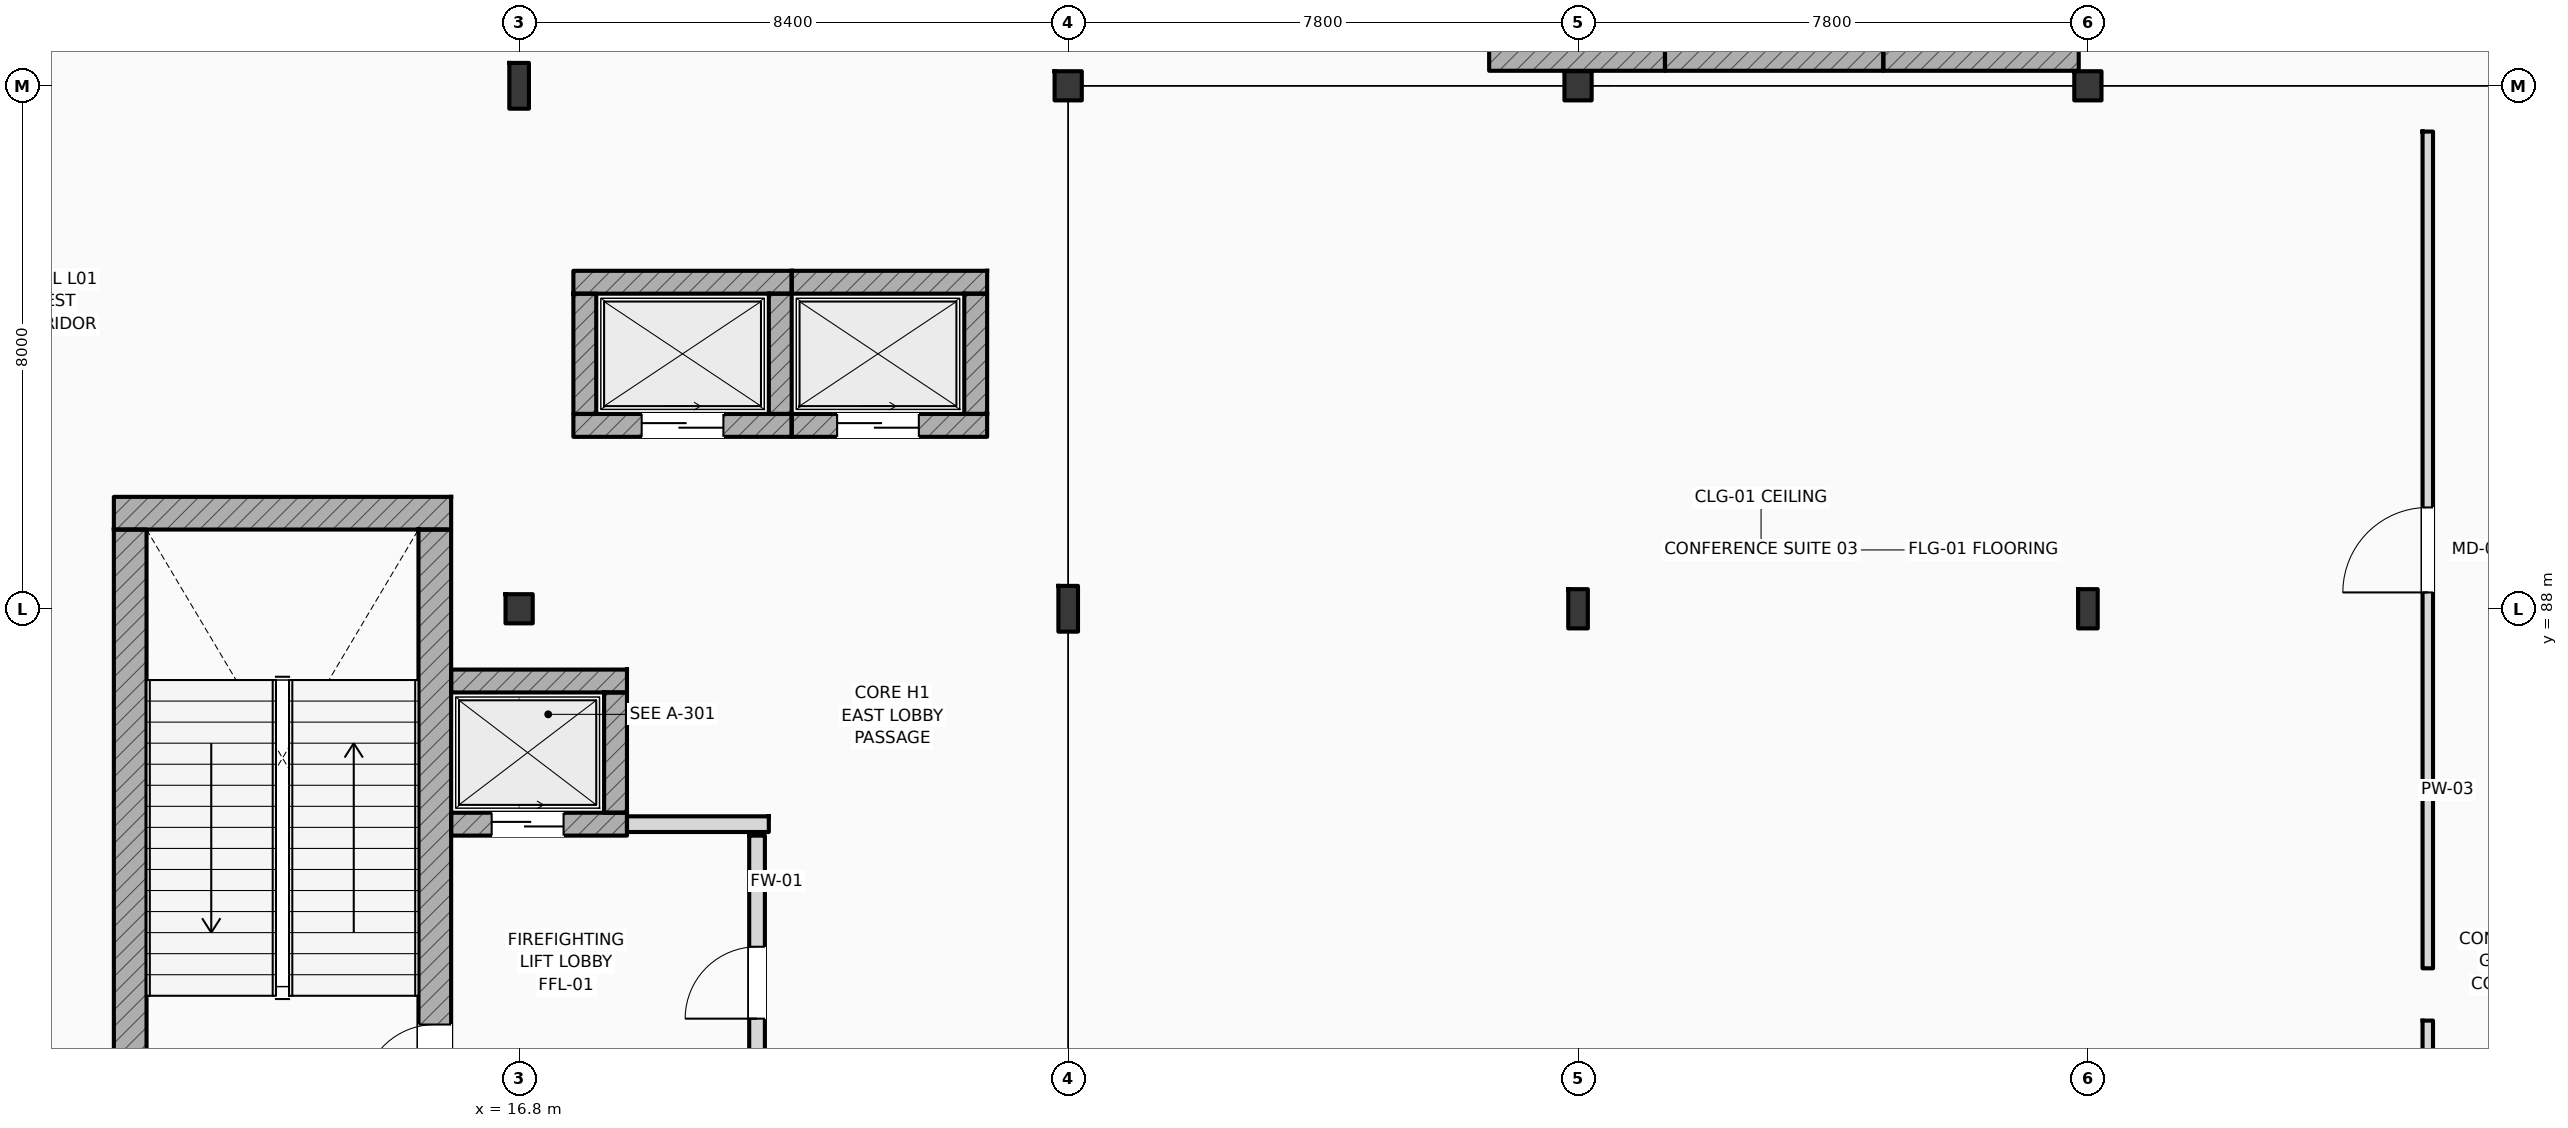
"""IFC4 building model, lengths in metres.
Left out: names, types, materials, properties, quantities, classifications, styles, units other than length and angle.
Written with IfcOpenShell. Run it as: python <this file> out.ifc"""

import sys

from ifc_helpers import new_model, si_unit, direction, frame, frame_2d, origin, origin_2d, place, context, subcontext, project, spatial, rectangle, i_section, extrude, element, fill, save


model = new_model("IFC4")
c1 = context("Model", 3, precision=1e-05, world=origin(), true_north=direction((0.0, 1.0)))
c2 = subcontext(c1, "Body", "Model", "MODEL_VIEW")
j1 = project(units=[si_unit("LENGTHUNIT", "METRE"), si_unit("PLANEANGLEUNIT", "RADIAN")], contexts=[c1])
p1 = place(None, origin())
s1 = spatial("IfcSite", under=j1, at=p1, CompositionType="ELEMENT")
p2 = place(p1, origin())
s2 = spatial("IfcBuilding", under=s1, at=p2, CompositionType="ELEMENT")
p3 = place(p2, frame((0.0, 0.0, 6.0)))
s3 = spatial("IfcBuildingStorey", under=s2, at=p3, CompositionType="ELEMENT", Elevation=6.0)
p4 = place(p3, frame((16.8, 88.0, 0.0), z_axis=(0.0, 0.0, 1.0), x_axis=(1.0, 0.0, 0.0)))
e1 = element("IfcColumn", 1, at=p4, inside=s3, PredefinedType="COLUMN", context=c2, shape_type="SweptSolid", body=[
    extrude(i_section(OverallWidth=0.416, OverallDepth=0.446, WebThickness=0.036, FlangeThickness=0.048, FilletRadius=0.015, at=origin_2d()), origin(), (0.0, 0.0, 1.0), 5.4),
])
for number, where, z_axis, x_axis in (
    (2, (16.8, 96.0, 0.0), (0.0, 0.0, 1.0), (1.0, 0.0, 0.0)),
    (3, (25.2, 88.0, 0.0), (0.0, 0.0, 1.0), (1.0, 0.0, 0.0)),
):
    element("IfcColumn", number, at=place(p3, frame(where, z_axis=z_axis, x_axis=x_axis)), inside=s3, PredefinedType="COLUMN", context=c2, shape_type="SweptSolid", body=[
        extrude(i_section(OverallWidth=0.3, OverallDepth=0.7, WebThickness=0.017, FlangeThickness=0.032, FilletRadius=0.027, at=origin_2d()), origin(), (0.0, 0.0, 1.0), 5.4),
    ])
for number, where, z_axis, x_axis in (
    (4, (25.2, 96.0, 0.0), (0.0, 0.0, 1.0), (1.0, 0.0, 0.0)),
    (5, (33.0, 96.0, 0.0), (0.0, 0.0, 1.0), (1.0, 0.0, 0.0)),
    (6, (40.8, 96.0, 0.0), (0.0, 0.0, 1.0), (1.0, 0.0, 0.0)),
):
    element("IfcColumn", number, at=place(p3, frame(where, z_axis=z_axis, x_axis=x_axis)), inside=s3, PredefinedType="COLUMN", context=c2, shape_type="SweptSolid", body=[
        extrude(i_section(OverallWidth=0.416, OverallDepth=0.446, WebThickness=0.036, FlangeThickness=0.048, FilletRadius=0.015, at=origin_2d()), origin(), (0.0, 0.0, 1.0), 5.4),
    ])
for number, where, z_axis, x_axis in (
    (7, (33.0, 88.0, 0.0), (0.0, 0.0, 1.0), (1.0, 0.0, 0.0)),
    (8, (40.8, 88.0, 0.0), (0.0, 0.0, 1.0), (1.0, 0.0, 0.0)),
):
    element("IfcColumn", number, at=place(p3, frame(where, z_axis=z_axis, x_axis=x_axis)), inside=s3, PredefinedType="COLUMN", context=c2, shape_type="SweptSolid", body=[
        extrude(i_section(OverallWidth=0.3, OverallDepth=0.6, WebThickness=0.015, FlangeThickness=0.03, FilletRadius=0.027, at=origin_2d()), origin(), (0.0, 0.0, 1.0), 5.4),
    ])
p5 = place(p3, frame((10.6, 89.462, 0.0), z_axis=(0.0, 0.0, 1.0), x_axis=(1.0, 0.0, 0.0)))
e9 = element("IfcWall", 9, at=p5, inside=s3, PredefinedType="SHEAR", context=c2, shape_type="SweptSolid", body=[
    extrude(rectangle(XDim=5.16, YDim=0.5, at=frame_2d((2.58, 0.0))), origin(), (0.0, 0.0, 1.0), 5.4),
])
p6 = place(p3, frame((10.85, 80.1, 0.0), z_axis=(0.0, 0.0, 1.0), x_axis=(0.0, 1.0, 0.0)))
e10 = element("IfcWall", 10, at=p6, inside=s3, PredefinedType="SHEAR", context=c2, shape_type="SweptSolid", body=[
    extrude(rectangle(XDim=9.112, YDim=0.5, at=frame_2d((4.556, 0.0))), origin(), (0.0, 0.0, 1.0), 5.4),
])
p7 = place(p3, frame((15.51, 80.1, 0.0), z_axis=(0.0, 0.0, 1.0), x_axis=(0.0, 1.0, 0.0)))
e11 = element("IfcWall", 11, at=p7, inside=s3, PredefinedType="SHEAR", context=c2, shape_type="SweptSolid", body=[
    extrude(rectangle(XDim=9.112, YDim=0.5, at=frame_2d((4.556, 0.0))), origin(), (0.0, 0.0, 1.0), 5.4),
])
p8 = place(p7, frame((0.44, 0.0, 0.0)))
e12 = element("IfcOpeningElement", 12, at=p8, cuts=e11, PredefinedType="OPENING", context=c2, shape_type="SweptSolid", body=[
    extrude(rectangle(XDim=1.1, YDim=2.2, at=frame_2d((0.55, 1.1))), frame((0.0, 0.26, 0.0), z_axis=(0.0, -1.0, 0.0), x_axis=(1.0, 0.0, 0.0)), (0.0, 0.0, 1.0), 0.52),
])
p9 = place(p3, frame((15.76, 86.895, 0.0), z_axis=(0.0, 0.0, 1.0), x_axis=(1.0, 0.0, 0.0)))
e13 = element("IfcWall", 13, at=p9, inside=s3, PredefinedType="SHEAR", context=c2, shape_type="SweptSolid", body=[
    extrude(rectangle(XDim=2.69, YDim=0.35, at=frame_2d((1.345, 0.0))), origin(), (0.0, 0.0, 1.0), 5.05),
])
p10 = place(p3, frame((15.76, 84.705, 0.0), z_axis=(0.0, 0.0, 1.0), x_axis=(1.0, 0.0, 0.0)))
e14 = element("IfcWall", 14, at=p10, inside=s3, PredefinedType="SHEAR", context=c2, shape_type="SweptSolid", body=[
    extrude(rectangle(XDim=2.69, YDim=0.35, at=frame_2d((1.345, 0.0))), origin(), (0.0, 0.0, 1.0), 5.05),
])
p11 = place(p10, frame((0.62, 0.0, 0.0)))
e15 = element("IfcOpeningElement", 15, at=p11, cuts=e14, PredefinedType="OPENING", context=c2, shape_type="SweptSolid", body=[
    extrude(rectangle(XDim=1.1, YDim=2.2, at=frame_2d((0.55, 1.1))), frame((0.0, 0.185, 0.0), z_axis=(0.0, -1.0, 0.0), x_axis=(1.0, 0.0, 0.0)), (0.0, 0.0, 1.0), 0.37),
])
p12 = place(p3, frame((18.275, 84.88, 0.0), z_axis=(0.0, 0.0, 1.0), x_axis=(0.0, 1.0, 0.0)))
e16 = element("IfcWall", 16, at=p12, inside=s3, PredefinedType="SHEAR", context=c2, shape_type="SweptSolid", body=[
    extrude(rectangle(XDim=1.84, YDim=0.35, at=frame_2d((0.92, 0.0))), origin(), (0.0, 0.0, 1.0), 5.05),
])
p13 = place(p3, frame((31.64, 96.405, 0.0), z_axis=(0.0, 0.0, 1.0), x_axis=(1.0, 0.0, 0.0)))
e17 = element("IfcWall", 17, at=p13, inside=s3, PredefinedType="SHEAR", context=c2, shape_type="SweptSolid", body=[
    extrude(rectangle(XDim=2.69, YDim=0.35, at=frame_2d((1.345, 0.0))), origin(), (0.0, 0.0, 1.0), 5.05),
])
p14 = place(p3, frame((17.63, 92.995, 0.0), z_axis=(0.0, 0.0, 1.0), x_axis=(1.0, 0.0, 0.0)))
e18 = element("IfcWall", 18, at=p14, inside=s3, PredefinedType="SHEAR", context=c2, shape_type="SweptSolid", body=[
    extrude(rectangle(XDim=3.34, YDim=0.35, at=frame_2d((1.67, 0.0))), origin(), (0.0, 0.0, 1.0), 5.05),
])
p15 = place(p3, frame((17.63, 90.805, 0.0), z_axis=(0.0, 0.0, 1.0), x_axis=(1.0, 0.0, 0.0)))
e19 = element("IfcWall", 19, at=p15, inside=s3, PredefinedType="SHEAR", context=c2, shape_type="SweptSolid", body=[
    extrude(rectangle(XDim=3.34, YDim=0.35, at=frame_2d((1.67, 0.0))), origin(), (0.0, 0.0, 1.0), 5.05),
])
p16 = place(p15, frame((1.045, 0.0, 0.0)))
e20 = element("IfcOpeningElement", 20, at=p16, cuts=e19, PredefinedType="OPENING", context=c2, shape_type="SweptSolid", body=[
    extrude(rectangle(XDim=1.25, YDim=2.25, at=frame_2d((0.625, 1.125))), frame((0.0, 0.185, 0.0), z_axis=(0.0, -1.0, 0.0), x_axis=(1.0, 0.0, 0.0)), (0.0, 0.0, 1.0), 0.37),
])
for number, where, z_axis, x_axis in (
    (21, (17.805, 90.98, 0.0), (0.0, 0.0, 1.0), (0.0, 1.0, 0.0)),
    (22, (20.795, 90.98, 0.0), (0.0, 0.0, 1.0), (0.0, 1.0, 0.0)),
):
    element("IfcWall", number, at=place(p3, frame(where, z_axis=z_axis, x_axis=x_axis)), inside=s3, PredefinedType="SHEAR", context=c2, shape_type="SweptSolid", body=[
        extrude(rectangle(XDim=1.84, YDim=0.35, at=frame_2d((0.92, 0.0))), origin(), (0.0, 0.0, 1.0), 5.05),
    ])
p17 = place(p3, frame((20.97, 92.995, 0.0), z_axis=(0.0, 0.0, 1.0), x_axis=(1.0, 0.0, 0.0)))
e23 = element("IfcWall", 23, at=p17, inside=s3, PredefinedType="SHEAR", context=c2, shape_type="SweptSolid", body=[
    extrude(rectangle(XDim=2.99, YDim=0.35, at=frame_2d((1.495, 0.0))), origin(), (0.0, 0.0, 1.0), 5.05),
])
p18 = place(p3, frame((20.97, 90.805, 0.0), z_axis=(0.0, 0.0, 1.0), x_axis=(1.0, 0.0, 0.0)))
e24 = element("IfcWall", 24, at=p18, inside=s3, PredefinedType="SHEAR", context=c2, shape_type="SweptSolid", body=[
    extrude(rectangle(XDim=2.99, YDim=0.35, at=frame_2d((1.495, 0.0))), origin(), (0.0, 0.0, 1.0), 5.05),
])
p19 = place(p18, frame((0.695, 0.0, 0.0)))
e25 = element("IfcOpeningElement", 25, at=p19, cuts=e24, PredefinedType="OPENING", context=c2, shape_type="SweptSolid", body=[
    extrude(rectangle(XDim=1.25, YDim=2.25, at=frame_2d((0.625, 1.125))), frame((0.0, 0.185, 0.0), z_axis=(0.0, -1.0, 0.0), x_axis=(1.0, 0.0, 0.0)), (0.0, 0.0, 1.0), 0.37),
])
p20 = place(p3, frame((23.785, 90.98, 0.0), z_axis=(0.0, 0.0, 1.0), x_axis=(0.0, 1.0, 0.0)))
e26 = element("IfcWall", 26, at=p20, inside=s3, PredefinedType="SHEAR", context=c2, shape_type="SweptSolid", body=[
    extrude(rectangle(XDim=1.84, YDim=0.35, at=frame_2d((0.92, 0.0))), origin(), (0.0, 0.0, 1.0), 5.05),
])
p21 = place(p3, frame((34.33, 96.405, 0.0), z_axis=(0.0, 0.0, 1.0), x_axis=(1.0, 0.0, 0.0)))
e27 = element("IfcWall", 27, at=p21, inside=s3, PredefinedType="SHEAR", context=c2, shape_type="SweptSolid", body=[
    extrude(rectangle(XDim=3.34, YDim=0.35, at=frame_2d((1.67, 0.0))), origin(), (0.0, 0.0, 1.0), 5.05),
])
p22 = place(p3, frame((37.67, 96.405, 0.0), z_axis=(0.0, 0.0, 1.0), x_axis=(1.0, 0.0, 0.0)))
e28 = element("IfcWall", 28, at=p22, inside=s3, PredefinedType="SHEAR", context=c2, shape_type="SweptSolid", body=[
    extrude(rectangle(XDim=2.99, YDim=0.35, at=frame_2d((1.495, 0.0))), origin(), (0.0, 0.0, 1.0), 5.05),
])
p23 = place(p3, frame((18.45, 84.705, 0.0), z_axis=(0.0, 0.0, 1.0), x_axis=(1.0, 0.0, 0.0)))
e29 = element("IfcWall", 29, at=p23, inside=s3, PredefinedType="STANDARD", context=c2, shape_type="SweptSolid", body=[
    extrude(rectangle(XDim=2.17, YDim=0.24, at=frame_2d((1.085, 0.0))), origin(), (0.0, 0.0, 1.0), 5.05),
])
p24 = place(p3, frame((20.44, 80.08, 0.0), z_axis=(0.0, 0.0, 1.0), x_axis=(0.0, 1.0, 0.0)))
e30 = element("IfcWall", 30, at=p24, inside=s3, PredefinedType="STANDARD", context=c2, shape_type="SweptSolid", body=[
    extrude(rectangle(XDim=4.45, YDim=0.24, at=frame_2d((2.225, 0.0))), origin(), (0.0, 0.0, 1.0), 5.05),
])
p25 = place(p24, frame((1.65, 0.0, 0.0)))
e31 = element("IfcOpeningElement", 31, at=p25, cuts=e30, PredefinedType="OPENING", context=c2, shape_type="SweptSolid", body=[
    extrude(rectangle(XDim=1.1, YDim=2.2, at=frame_2d((0.55, 1.1))), frame((0.0, 0.13, 0.0), z_axis=(0.0, -1.0, 0.0), x_axis=(1.0, 0.0, 0.0)), (0.0, 0.0, 1.0), 0.26),
])
p26 = place(p3, frame((46.0, 68.5, 0.0), z_axis=(0.0, 0.0, 1.0), x_axis=(0.0, 1.0, 0.0)))
e32 = element("IfcWall", 32, at=p26, inside=s3, PredefinedType="PARTITIONING", context=c2, shape_type="SweptSolid", body=[
    extrude(rectangle(XDim=13.2, YDim=0.16, at=frame_2d((6.6, 0.0))), origin(), (0.0, 0.0, 1.0), 4.71),
])
p27 = place(p26, frame((5.95, 0.0, 0.0)))
e33 = element("IfcOpeningElement", 33, at=p27, cuts=e32, PredefinedType="OPENING", context=c2, shape_type="SweptSolid", body=[
    extrude(rectangle(XDim=1.3, YDim=2.2, at=frame_2d((0.65, 1.1))), frame((0.0, 0.09, 0.0), z_axis=(0.0, -1.0, 0.0), x_axis=(1.0, 0.0, 0.0)), (0.0, 0.0, 1.0), 0.18),
])
p28 = place(p3, frame((46.0, 82.5, 0.0), z_axis=(0.0, 0.0, 1.0), x_axis=(0.0, 1.0, 0.0)))
e34 = element("IfcWall", 34, at=p28, inside=s3, PredefinedType="PARTITIONING", context=c2, shape_type="SweptSolid", body=[
    extrude(rectangle(XDim=12.8, YDim=0.16, at=frame_2d((6.4, 0.0))), origin(), (0.0, 0.0, 1.0), 4.71),
])
p29 = place(p28, frame((5.75, 0.0, 0.0)))
e35 = element("IfcOpeningElement", 35, at=p29, cuts=e34, PredefinedType="OPENING", context=c2, shape_type="SweptSolid", body=[
    extrude(rectangle(XDim=1.3, YDim=2.2, at=frame_2d((0.65, 1.1))), frame((0.0, 0.09, 0.0), z_axis=(0.0, -1.0, 0.0), x_axis=(1.0, 0.0, 0.0)), (0.0, 0.0, 1.0), 0.18),
])
p30 = place(p8, origin())
e36 = element("IfcDoor", 36, at=p30, inside=s3, OperationType="SINGLE_SWING_LEFT", PredefinedType="DOOR", context=c2, shape_type="SweptSolid", body=[
    extrude(rectangle(XDim=1.1, YDim=2.2, at=frame_2d((0.55, 1.1))), frame((0.0, 0.025, 0.0), z_axis=(0.0, -1.0, 0.0), x_axis=(1.0, 0.0, 0.0)), (0.0, 0.0, 1.0), 0.05),
])
fill(e12, e36)
p31 = place(p11, origin())
e37 = element("IfcDoor", 37, at=p31, inside=s3, OperationType="SLIDING_TO_LEFT", PredefinedType="DOOR", context=c2, shape_type="SweptSolid", body=[
    extrude(rectangle(XDim=1.1, YDim=2.2, at=frame_2d((0.55, 1.1))), frame((0.0, 0.025, 0.0), z_axis=(0.0, -1.0, 0.0), x_axis=(1.0, 0.0, 0.0)), (0.0, 0.0, 1.0), 0.05),
])
fill(e15, e37)
p32 = place(p16, origin())
e38 = element("IfcDoor", 38, at=p32, inside=s3, OperationType="SLIDING_TO_LEFT", PredefinedType="DOOR", context=c2, shape_type="SweptSolid", body=[
    extrude(rectangle(XDim=1.25, YDim=2.25, at=frame_2d((0.625, 1.125))), frame((0.0, 0.025, 0.0), z_axis=(0.0, -1.0, 0.0), x_axis=(1.0, 0.0, 0.0)), (0.0, 0.0, 1.0), 0.05),
])
fill(e20, e38)
p33 = place(p19, origin())
e39 = element("IfcDoor", 39, at=p33, inside=s3, OperationType="SLIDING_TO_LEFT", PredefinedType="DOOR", context=c2, shape_type="SweptSolid", body=[
    extrude(rectangle(XDim=1.25, YDim=2.25, at=frame_2d((0.625, 1.125))), frame((0.0, 0.025, 0.0), z_axis=(0.0, -1.0, 0.0), x_axis=(1.0, 0.0, 0.0)), (0.0, 0.0, 1.0), 0.05),
])
fill(e25, e39)
p34 = place(p25, origin())
e40 = element("IfcDoor", 40, at=p34, inside=s3, OperationType="SINGLE_SWING_LEFT", PredefinedType="DOOR", context=c2, shape_type="SweptSolid", body=[
    extrude(rectangle(XDim=1.1, YDim=2.2, at=frame_2d((0.55, 1.1))), frame((0.0, 0.025, 0.0), z_axis=(0.0, -1.0, 0.0), x_axis=(1.0, 0.0, 0.0)), (0.0, 0.0, 1.0), 0.05),
])
fill(e31, e40)
p35 = place(p29, origin())
e41 = element("IfcDoor", 41, at=p35, inside=s3, OperationType="SINGLE_SWING_LEFT", PredefinedType="DOOR", context=c2, shape_type="SweptSolid", body=[
    extrude(rectangle(XDim=1.3, YDim=2.2, at=frame_2d((0.65, 1.1))), frame((0.0, 0.025, 0.0), z_axis=(0.0, -1.0, 0.0), x_axis=(1.0, 0.0, 0.0)), (0.0, 0.0, 1.0), 0.05),
])
fill(e35, e41)
save(model, sys.argv[1])
